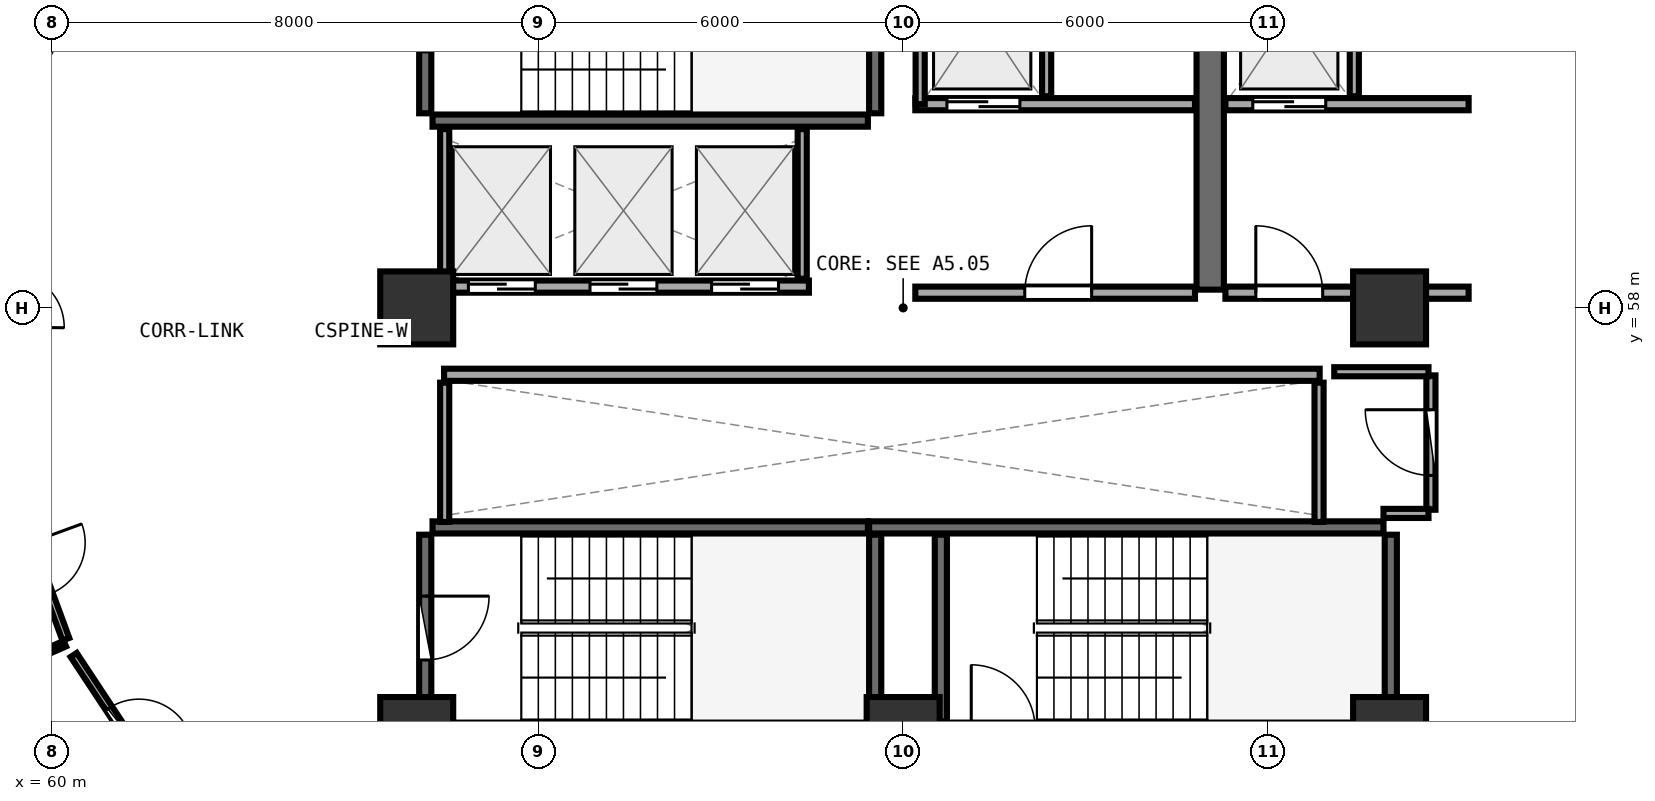
"""IFC4 building model, lengths in metres.
Left out: names, types, materials, properties, quantities, classifications, styles, units other than length and angle.
Written with IfcOpenShell. Run it as: python <this file> out.ifc"""

import sys

from ifc_helpers import new_model, si_unit, direction, frame, frame_2d, origin, origin_2d, place, context, subcontext, project, spatial, rectangle, extrude, element, fill, save


model = new_model("IFC4")
c1 = context("Model", 3, precision=1e-05, world=origin(), true_north=direction((0.0, 1.0)))
c2 = subcontext(c1, "Body", "Model", "MODEL_VIEW")
j1 = project(units=[si_unit("LENGTHUNIT", "METRE"), si_unit("PLANEANGLEUNIT", "RADIAN")], contexts=[c1])
p1 = place(None, origin())
s1 = spatial("IfcSite", under=j1, at=p1, CompositionType="ELEMENT")
p2 = place(p1, origin())
s2 = spatial("IfcBuilding", under=s1, at=p2, CompositionType="ELEMENT")
p3 = place(p2, frame((0.0, 0.0, 117.6)))
s3 = spatial("IfcBuildingStorey", under=s2, at=p3, CompositionType="ELEMENT", Elevation=117.6)
for number, where, z_axis, x_axis in (
    (1, (66.0, 51.0, 0.0), (0.0, 0.0, 1.0), (1.0, 0.0, 0.0)),
    (2, (74.0, 51.0, 0.0), (0.0, 0.0, 1.0), (1.0, 0.0, 0.0)),
    (3, (82.0, 51.0, 0.0), (0.0, 0.0, 1.0), (1.0, 0.0, 0.0)),
    (4, (82.0, 58.0, 0.0), (0.0, 0.0, 1.0), (1.0, 0.0, 0.0)),
    (5, (66.0, 58.0, 0.0), (0.0, 0.0, 1.0), (1.0, 0.0, 0.0)),
):
    element("IfcColumn", number, at=place(p3, frame(where, z_axis=z_axis, x_axis=x_axis)), inside=s3, PredefinedType="PILASTER", context=c2, shape_type="SweptSolid", body=[
        extrude(rectangle(XDim=1.2, YDim=1.2, at=origin_2d()), origin(), (0.0, 0.0, 1.0), 3.75),
    ])
p4 = place(p3, frame((66.26, 61.08, 0.0), z_axis=(0.0, 0.0, 1.0), x_axis=(1.0, 0.0, 0.0)))
e6 = element("IfcWall", 6, at=p4, inside=s3, PredefinedType="SHEAR", context=c2, shape_type="SweptSolid", body=[
    extrude(rectangle(XDim=7.16, YDim=0.2, at=frame_2d((3.58, 0.0))), origin(), (0.0, 0.0, 1.0), 3.49),
])
p5 = place(p3, frame((73.54, 61.2, 0.0), z_axis=(0.0, 0.0, 1.0), x_axis=(0.0, 1.0, 0.0)))
e7 = element("IfcWall", 7, at=p5, inside=s3, PredefinedType="SHEAR", context=c2, shape_type="SweptSolid", body=[
    extrude(rectangle(XDim=3.07, YDim=0.2, at=frame_2d((1.535, 0.0))), origin(), (0.0, 0.0, 1.0), 3.49),
])
p6 = place(p3, frame((66.14, 64.27, 0.0), z_axis=(0.0, 0.0, 1.0), x_axis=(0.0, -1.0, 0.0)))
e8 = element("IfcWall", 8, at=p6, inside=s3, PredefinedType="SHEAR", context=c2, shape_type="SweptSolid", body=[
    extrude(rectangle(XDim=3.07, YDim=0.2, at=frame_2d((1.535, 0.0))), origin(), (0.0, 0.0, 1.0), 3.49),
])
p7 = place(p6, frame((1.01, 0.0, 0.0)))
e9 = element("IfcOpeningElement", 9, at=p7, cuts=e8, PredefinedType="OPENING", context=c2, shape_type="SweptSolid", body=[
    extrude(rectangle(XDim=1.05, YDim=2.1, at=frame_2d((0.525, 1.05))), frame((0.0, 0.11, 0.0), z_axis=(0.0, -1.0, 0.0), x_axis=(1.0, 0.0, 0.0)), (0.0, 0.0, 1.0), 0.22),
])
p8 = place(p3, frame((82.02, 51.2, 0.0), z_axis=(0.0, 0.0, 1.0), x_axis=(0.0, 1.0, 0.0)))
e10 = element("IfcWall", 10, at=p8, inside=s3, PredefinedType="SHEAR", context=c2, shape_type="SweptSolid", body=[
    extrude(rectangle(XDim=3.07, YDim=0.2, at=frame_2d((1.535, 0.0))), origin(), (0.0, 0.0, 1.0), 3.49),
])
p9 = place(p3, frame((81.9, 54.39, 0.0), z_axis=(0.0, 0.0, 1.0), x_axis=(-1.0, 0.0, 0.0)))
e11 = element("IfcWall", 11, at=p9, inside=s3, PredefinedType="SHEAR", context=c2, shape_type="SweptSolid", body=[
    extrude(rectangle(XDim=8.46, YDim=0.2, at=frame_2d((4.23, 0.0))), origin(), (0.0, 0.0, 1.0), 3.49),
])
for number, where, z_axis, x_axis in (
    (12, (74.62, 54.27, 0.0), (0.0, 0.0, 1.0), (0.0, -1.0, 0.0)),
    (13, (73.54, 51.2, 0.0), (0.0, 0.0, 1.0), (0.0, 1.0, 0.0)),
):
    element("IfcWall", number, at=place(p3, frame(where, z_axis=z_axis, x_axis=x_axis)), inside=s3, PredefinedType="SHEAR", context=c2, shape_type="SweptSolid", body=[
        extrude(rectangle(XDim=3.07, YDim=0.2, at=frame_2d((1.535, 0.0))), origin(), (0.0, 0.0, 1.0), 3.49),
    ])
p10 = place(p3, frame((73.42, 54.39, 0.0), z_axis=(0.0, 0.0, 1.0), x_axis=(-1.0, 0.0, 0.0)))
e14 = element("IfcWall", 14, at=p10, inside=s3, PredefinedType="SHEAR", context=c2, shape_type="SweptSolid", body=[
    extrude(rectangle(XDim=7.16, YDim=0.2, at=frame_2d((3.58, 0.0))), origin(), (0.0, 0.0, 1.0), 3.49),
])
p11 = place(p3, frame((66.14, 54.27, 0.0), z_axis=(0.0, 0.0, 1.0), x_axis=(0.0, -1.0, 0.0)))
e15 = element("IfcWall", 15, at=p11, inside=s3, PredefinedType="SHEAR", context=c2, shape_type="SweptSolid", body=[
    extrude(rectangle(XDim=3.07, YDim=0.2, at=frame_2d((1.535, 0.0))), origin(), (0.0, 0.0, 1.0), 3.49),
])
p12 = place(p11, frame((1.01, 0.0, 0.0)))
e16 = element("IfcOpeningElement", 16, at=p12, cuts=e15, PredefinedType="OPENING", context=c2, shape_type="SweptSolid", body=[
    extrude(rectangle(XDim=1.05, YDim=2.1, at=frame_2d((0.525, 1.05))), frame((0.0, 0.11, 0.0), z_axis=(0.0, -1.0, 0.0), x_axis=(1.0, 0.0, 0.0)), (0.0, 0.0, 1.0), 0.22),
])
p13 = place(p3, frame((79.05, 58.3, 0.0), z_axis=(0.0, 0.0, 1.0), x_axis=(0.0, 1.0, 0.0)))
e17 = element("IfcWall", 17, at=p13, inside=s3, PredefinedType="SHEAR", context=c2, shape_type="SweptSolid", body=[
    extrude(rectangle(XDim=6.3, YDim=0.45, at=frame_2d((3.15, 0.0))), origin(), (0.0, 0.0, 1.0), 3.49),
])
p14 = place(p3, frame((74.2, 61.35, 0.0), z_axis=(0.0, 0.0, 1.0), x_axis=(1.0, 0.0, 0.0)))
e18 = element("IfcWall", 18, at=p14, inside=s3, PredefinedType="SOLIDWALL", context=c2, shape_type="SweptSolid", body=[
    extrude(rectangle(XDim=4.6, YDim=0.2, at=frame_2d((2.3, 0.0))), origin(), (0.0, 0.0, 1.0), 3.48),
])
p15 = place(p14, frame((0.52, 0.0, 0.0)))
e19 = element("IfcOpeningElement", 19, at=p15, cuts=e18, PredefinedType="OPENING", context=c2, shape_type="SweptSolid", body=[
    extrude(rectangle(XDim=1.2, YDim=2.15, at=frame_2d((0.6, 1.075))), frame((0.0, 0.11, 0.0), z_axis=(0.0, -1.0, 0.0), x_axis=(1.0, 0.0, 0.0)), (0.0, 0.0, 1.0), 0.22),
])
p16 = place(p3, frame((74.28, 61.35, 0.0), z_axis=(0.0, 0.0, 1.0), x_axis=(0.0, 1.0, 0.0)))
e20 = element("IfcWall", 20, at=p16, inside=s3, PredefinedType="PARTITIONING", context=c2, shape_type="SweptSolid", body=[
    extrude(rectangle(XDim=2.97, YDim=0.15, at=frame_2d((1.485, 0.0))), origin(), (0.0, 0.0, 1.0), 3.48),
])
p17 = place(p3, frame((76.36, 61.48, 0.0), z_axis=(0.0, 0.0, 1.0), x_axis=(0.0, 1.0, 0.0)))
e21 = element("IfcWall", 21, at=p17, inside=s3, PredefinedType="PARTITIONING", context=c2, shape_type="SweptSolid", body=[
    extrude(rectangle(XDim=2.84, YDim=0.15, at=frame_2d((1.42, 0.0))), origin(), (0.0, 0.0, 1.0), 3.48),
])
p18 = place(p3, frame((79.3, 61.35, 0.0), z_axis=(0.0, 0.0, 1.0), x_axis=(1.0, 0.0, 0.0)))
e22 = element("IfcWall", 22, at=p18, inside=s3, PredefinedType="SOLIDWALL", context=c2, shape_type="SweptSolid", body=[
    extrude(rectangle(XDim=4.0, YDim=0.2, at=frame_2d((2.0, 0.0))), origin(), (0.0, 0.0, 1.0), 2.775),
])
p19 = place(p18, frame((0.45, 0.0, 0.0)))
e23 = element("IfcOpeningElement", 23, at=p19, cuts=e22, PredefinedType="OPENING", context=c2, shape_type="SweptSolid", body=[
    extrude(rectangle(XDim=1.2, YDim=2.15, at=frame_2d((0.6, 1.075))), frame((0.0, 0.11, 0.0), z_axis=(0.0, -1.0, 0.0), x_axis=(1.0, 0.0, 0.0)), (0.0, 0.0, 1.0), 0.22),
])
p20 = place(p3, frame((81.42, 61.48, 0.0), z_axis=(0.0, 0.0, 1.0), x_axis=(0.0, 1.0, 0.0)))
e24 = element("IfcWall", 24, at=p20, inside=s3, PredefinedType="PARTITIONING", context=c2, shape_type="SweptSolid", body=[
    extrude(rectangle(XDim=2.84, YDim=0.15, at=frame_2d((1.42, 0.0))), origin(), (0.0, 0.0, 1.0), 3.48),
])
p21 = place(p3, frame((74.2, 58.25, 0.0), z_axis=(0.0, 0.0, 1.0), x_axis=(1.0, 0.0, 0.0)))
e25 = element("IfcWall", 25, at=p21, inside=s3, PredefinedType="SOLIDWALL", context=c2, shape_type="SweptSolid", body=[
    extrude(rectangle(XDim=4.6, YDim=0.2, at=frame_2d((2.3, 0.0))), origin(), (0.0, 0.0, 1.0), 3.48),
])
p22 = place(p21, frame((1.8, 0.0, 0.0)))
e26 = element("IfcOpeningElement", 26, at=p22, cuts=e25, PredefinedType="OPENING", context=c2, shape_type="SweptSolid", body=[
    extrude(rectangle(XDim=1.1, YDim=2.1, at=frame_2d((0.55, 1.05))), frame((0.0, 0.11, 0.0), z_axis=(0.0, -1.0, 0.0), x_axis=(1.0, 0.0, 0.0)), (0.0, 0.0, 1.0), 0.22),
])
p23 = place(p3, frame((79.3, 58.25, 0.0), z_axis=(0.0, 0.0, 1.0), x_axis=(1.0, 0.0, 0.0)))
e27 = element("IfcWall", 27, at=p23, inside=s3, PredefinedType="SOLIDWALL", context=c2, shape_type="SweptSolid", body=[
    extrude(rectangle(XDim=4.0, YDim=0.2, at=frame_2d((2.0, 0.0))), origin(), (0.0, 0.0, 1.0), 2.775),
])
p24 = place(p23, frame((0.5, 0.0, 0.0)))
e28 = element("IfcOpeningElement", 28, at=p24, cuts=e27, PredefinedType="OPENING", context=c2, shape_type="SweptSolid", body=[
    extrude(rectangle(XDim=1.1, YDim=2.1, at=frame_2d((0.55, 1.05))), frame((0.0, 0.11, 0.0), z_axis=(0.0, -1.0, 0.0), x_axis=(1.0, 0.0, 0.0)), (0.0, 0.0, 1.0), 0.22),
])
p25 = place(p3, frame((66.45, 58.35, 0.0), z_axis=(0.0, 0.0, 1.0), x_axis=(1.0, 0.0, 0.0)))
e29 = element("IfcWall", 29, at=p25, inside=s3, PredefinedType="SOLIDWALL", context=c2, shape_type="SweptSolid", body=[
    extrude(rectangle(XDim=6.0, YDim=0.2, at=frame_2d((3.0, 0.0))), origin(), (0.0, 0.0, 1.0), 3.48),
])
p26 = place(p25, frame((0.4, 0.0, 0.0)))
e30 = element("IfcOpeningElement", 30, at=p26, cuts=e29, PredefinedType="OPENING", context=c2, shape_type="SweptSolid", body=[
    extrude(rectangle(XDim=1.1, YDim=2.1, at=frame_2d((0.55, 1.05))), frame((0.0, 0.11, 0.0), z_axis=(0.0, -1.0, 0.0), x_axis=(1.0, 0.0, 0.0)), (0.0, 0.0, 1.0), 0.22),
])
p27 = place(p25, frame((2.4, 0.0, 0.0)))
e31 = element("IfcOpeningElement", 31, at=p27, cuts=e29, PredefinedType="OPENING", context=c2, shape_type="SweptSolid", body=[
    extrude(rectangle(XDim=1.1, YDim=2.1, at=frame_2d((0.55, 1.05))), frame((0.0, 0.11, 0.0), z_axis=(0.0, -1.0, 0.0), x_axis=(1.0, 0.0, 0.0)), (0.0, 0.0, 1.0), 0.22),
])
p28 = place(p25, frame((4.4, 0.0, 0.0)))
e32 = element("IfcOpeningElement", 32, at=p28, cuts=e29, PredefinedType="OPENING", context=c2, shape_type="SweptSolid", body=[
    extrude(rectangle(XDim=1.1, YDim=2.1, at=frame_2d((0.55, 1.05))), frame((0.0, 0.11, 0.0), z_axis=(0.0, -1.0, 0.0), x_axis=(1.0, 0.0, 0.0)), (0.0, 0.0, 1.0), 0.22),
])
for number, where, z_axis, x_axis in (
    (33, (66.46, 58.48, 0.0), (0.0, 0.0, 1.0), (0.0, 1.0, 0.0)),
    (34, (72.34, 58.48, 0.0), (0.0, 0.0, 1.0), (0.0, 1.0, 0.0)),
):
    element("IfcWall", number, at=place(p3, frame(where, z_axis=z_axis, x_axis=x_axis)), inside=s3, PredefinedType="PARTITIONING", context=c2, shape_type="SweptSolid", body=[
        extrude(rectangle(XDim=2.46, YDim=0.15, at=frame_2d((1.23, 0.0))), origin(), (0.0, 0.0, 1.0), 3.48),
    ])
p29 = place(p3, frame((66.45, 56.9, 0.0), z_axis=(0.0, 0.0, 1.0), x_axis=(1.0, 0.0, 0.0)))
e35 = element("IfcWall", 35, at=p29, inside=s3, PredefinedType="SOLIDWALL", context=c2, shape_type="SweptSolid", body=[
    extrude(rectangle(XDim=14.4, YDim=0.2, at=frame_2d((7.2, 0.0))), origin(), (0.0, 0.0, 1.0), 3.48),
])
for number, where, z_axis, x_axis in (
    (36, (66.46, 54.48, 0.0), (0.0, 0.0, 1.0), (0.0, 1.0, 0.0)),
    (37, (80.84, 54.48, 0.0), (0.0, 0.0, 1.0), (0.0, 1.0, 0.0)),
):
    element("IfcWall", number, at=place(p3, frame(where, z_axis=z_axis, x_axis=x_axis)), inside=s3, PredefinedType="PARTITIONING", context=c2, shape_type="SweptSolid", body=[
        extrude(rectangle(XDim=2.29, YDim=0.15, at=frame_2d((1.145, 0.0))), origin(), (0.0, 0.0, 1.0), 3.48),
    ])
p30 = place(p3, frame((82.68, 54.68, 0.0), z_axis=(0.0, 0.0, 1.0), x_axis=(0.0, 1.0, 0.0)))
e38 = element("IfcWall", 38, at=p30, inside=s3, PredefinedType="PARTITIONING", context=c2, shape_type="SweptSolid", body=[
    extrude(rectangle(XDim=2.21, YDim=0.15, at=frame_2d((1.105, 0.0))), origin(), (0.0, 0.0, 1.0), 3.48),
])
p31 = place(p30, frame((0.565, 0.0, 0.0)))
e39 = element("IfcOpeningElement", 39, at=p31, cuts=e38, PredefinedType="OPENING", context=c2, shape_type="SweptSolid", body=[
    extrude(rectangle(XDim=1.08, YDim=2.1, at=frame_2d((0.54, 1.05))), frame((0.0, 0.085, 0.0), z_axis=(0.0, -1.0, 0.0), x_axis=(1.0, 0.0, 0.0)), (0.0, 0.0, 1.0), 0.17),
])
p32 = place(p3, frame((62.199, 66.421, 0.0), z_axis=(0.0, 0.0, 1.0), x_axis=(-0.478256103777, -0.878220416069, 0.0)))
e40 = element("IfcWall", 40, at=p32, inside=s3, PredefinedType="PARTITIONING", context=c2, shape_type="SweptSolid", body=[
    extrude(rectangle(XDim=5.741, YDim=0.12, at=frame_2d((2.871, 0.0))), origin(), (0.0, 0.0, 1.0), 2.925),
])
p33 = place(p32, frame((2.42, 0.0, 0.0)))
e41 = element("IfcOpeningElement", 41, at=p33, cuts=e40, PredefinedType="OPENING", context=c2, shape_type="SweptSolid", body=[
    extrude(rectangle(XDim=0.9, YDim=2.08, at=frame_2d((0.45, 1.04))), frame((0.0, 0.07, 0.0), z_axis=(0.0, -1.0, 0.0), x_axis=(1.0, 0.0, 0.0)), (0.0, 0.0, 1.0), 0.14),
])
p34 = place(p3, frame((59.375, 54.881, 0.0), z_axis=(0.0, 0.0, 1.0), x_axis=(0.344396316594, -0.938824359035, 0.0)))
e42 = element("IfcWall", 42, at=p34, inside=s3, PredefinedType="PARTITIONING", context=c2, shape_type="SweptSolid", body=[
    extrude(rectangle(XDim=2.481, YDim=0.12, at=frame_2d((1.241, 0.0))), origin(), (0.0, 0.0, 1.0), 3.235),
])
p35 = place(p34, frame((0.791, 0.0, 0.0)))
e43 = element("IfcOpeningElement", 43, at=p35, cuts=e42, PredefinedType="OPENING", context=c2, shape_type="SweptSolid", body=[
    extrude(rectangle(XDim=0.9, YDim=2.08, at=frame_2d((0.45, 1.04))), frame((0.0, 0.07, 0.0), z_axis=(0.0, -1.0, 0.0), x_axis=(1.0, 0.0, 0.0)), (0.0, 0.0, 1.0), 0.14),
])
p36 = place(p3, frame((60.358, 52.293, 0.0), z_axis=(0.0, 0.0, 1.0), x_axis=(0.551050840628, -0.834471671804, 0.0)))
e44 = element("IfcWall", 44, at=p36, inside=s3, PredefinedType="PARTITIONING", context=c2, shape_type="SweptSolid", body=[
    extrude(rectangle(XDim=3.0, YDim=0.12, at=frame_2d((1.5, 0.0))), origin(), (0.0, 0.0, 1.0), 2.925),
])
p37 = place(p36, frame((1.05, 0.0, 0.0)))
e45 = element("IfcOpeningElement", 45, at=p37, cuts=e44, PredefinedType="OPENING", context=c2, shape_type="SweptSolid", body=[
    extrude(rectangle(XDim=0.9, YDim=2.08, at=frame_2d((0.45, 1.04))), frame((0.0, 0.07, 0.0), z_axis=(0.0, -1.0, 0.0), x_axis=(1.0, 0.0, 0.0)), (0.0, 0.0, 1.0), 0.14),
])
p38 = place(p3, frame((81.9, 54.62, 0.0), z_axis=(0.0, 0.0, 1.0), x_axis=(1.0, 0.0, 0.0)))
e46 = element("IfcWall", 46, at=p38, inside=s3, PredefinedType="PARTITIONING", context=c2, shape_type="SweptSolid", body=[
    extrude(rectangle(XDim=0.74, YDim=0.15, at=frame_2d((0.37, 0.0))), origin(), (0.0, 0.0, 1.0), 2.775),
])
p39 = place(p3, frame((82.64, 56.95, 0.0), z_axis=(0.0, 0.0, 1.0), x_axis=(-1.0, 0.0, 0.0)))
e47 = element("IfcWall", 47, at=p39, inside=s3, PredefinedType="PARTITIONING", context=c2, shape_type="SweptSolid", body=[
    extrude(rectangle(XDim=1.55, YDim=0.15, at=frame_2d((0.775, 0.0))), origin(), (0.0, 0.0, 1.0), 2.775),
])
p40 = place(p3, frame((60.213, 52.479, 0.0), z_axis=(0.0, 0.0, 1.0), x_axis=(-0.914847920866, -0.403798565732, 0.0)))
e48 = element("IfcWall", 48, at=p40, inside=s3, PredefinedType="PARTITIONING", context=c2, shape_type="SweptSolid", body=[
    extrude(rectangle(XDim=3.719, YDim=0.1, at=frame_2d((1.86, 0.0))), origin(), (0.0, 0.0, 1.0), 3.175),
])
p41 = place(p12, origin())
e49 = element("IfcDoor", 49, at=p41, inside=s3, OperationType="SINGLE_SWING_LEFT", PredefinedType="DOOR", context=c2, shape_type="SweptSolid", body=[
    extrude(rectangle(XDim=1.05, YDim=2.1, at=frame_2d((0.525, 1.05))), frame((0.0, 0.025, 0.0), z_axis=(0.0, -1.0, 0.0), x_axis=(1.0, 0.0, 0.0)), (0.0, 0.0, 1.0), 0.05),
])
fill(e16, e49)
p42 = place(p15, origin())
e50 = element("IfcDoor", 50, at=p42, inside=s3, OperationType="DOUBLE_DOOR_SLIDING", PredefinedType="DOOR", context=c2, shape_type="SweptSolid", body=[
    extrude(rectangle(XDim=1.2, YDim=2.15, at=frame_2d((0.6, 1.075))), frame((0.0, 0.025, 0.0), z_axis=(0.0, -1.0, 0.0), x_axis=(1.0, 0.0, 0.0)), (0.0, 0.0, 1.0), 0.05),
])
fill(e19, e50)
p43 = place(p19, origin())
e51 = element("IfcDoor", 51, at=p43, inside=s3, OperationType="DOUBLE_DOOR_SLIDING", PredefinedType="DOOR", context=c2, shape_type="SweptSolid", body=[
    extrude(rectangle(XDim=1.2, YDim=2.15, at=frame_2d((0.6, 1.075))), frame((0.0, 0.025, 0.0), z_axis=(0.0, -1.0, 0.0), x_axis=(1.0, 0.0, 0.0)), (0.0, 0.0, 1.0), 0.05),
])
fill(e23, e51)
p44 = place(p22, frame((1.1, 0.0, 0.0), z_axis=(0.0, 0.0, 1.0), x_axis=(-1.0, 0.0, 0.0)))
e52 = element("IfcDoor", 52, at=p44, inside=s3, OperationType="SINGLE_SWING_LEFT", PredefinedType="DOOR", context=c2, shape_type="SweptSolid", body=[
    extrude(rectangle(XDim=1.1, YDim=2.1, at=frame_2d((0.55, 1.05))), frame((0.0, 0.025, 0.0), z_axis=(0.0, -1.0, 0.0), x_axis=(1.0, 0.0, 0.0)), (0.0, 0.0, 1.0), 0.05),
])
fill(e26, e52)
p45 = place(p24, frame((1.1, 0.0, 0.0), z_axis=(0.0, 0.0, 1.0), x_axis=(-1.0, 0.0, 0.0)))
e53 = element("IfcDoor", 53, at=p45, inside=s3, OperationType="SINGLE_SWING_RIGHT", PredefinedType="DOOR", context=c2, shape_type="SweptSolid", body=[
    extrude(rectangle(XDim=1.1, YDim=2.1, at=frame_2d((0.55, 1.05))), frame((0.0, 0.025, 0.0), z_axis=(0.0, -1.0, 0.0), x_axis=(1.0, 0.0, 0.0)), (0.0, 0.0, 1.0), 0.05),
])
fill(e28, e53)
p46 = place(p26, origin())
e54 = element("IfcDoor", 54, at=p46, inside=s3, OperationType="DOUBLE_DOOR_SLIDING", PredefinedType="DOOR", context=c2, shape_type="SweptSolid", body=[
    extrude(rectangle(XDim=1.1, YDim=2.1, at=frame_2d((0.55, 1.05))), frame((0.0, 0.025, 0.0), z_axis=(0.0, -1.0, 0.0), x_axis=(1.0, 0.0, 0.0)), (0.0, 0.0, 1.0), 0.05),
])
fill(e30, e54)
p47 = place(p27, origin())
e55 = element("IfcDoor", 55, at=p47, inside=s3, OperationType="DOUBLE_DOOR_SLIDING", PredefinedType="DOOR", context=c2, shape_type="SweptSolid", body=[
    extrude(rectangle(XDim=1.1, YDim=2.1, at=frame_2d((0.55, 1.05))), frame((0.0, 0.025, 0.0), z_axis=(0.0, -1.0, 0.0), x_axis=(1.0, 0.0, 0.0)), (0.0, 0.0, 1.0), 0.05),
])
fill(e31, e55)
p48 = place(p28, origin())
e56 = element("IfcDoor", 56, at=p48, inside=s3, OperationType="DOUBLE_DOOR_SLIDING", PredefinedType="DOOR", context=c2, shape_type="SweptSolid", body=[
    extrude(rectangle(XDim=1.1, YDim=2.1, at=frame_2d((0.55, 1.05))), frame((0.0, 0.025, 0.0), z_axis=(0.0, -1.0, 0.0), x_axis=(1.0, 0.0, 0.0)), (0.0, 0.0, 1.0), 0.05),
])
fill(e32, e56)
p49 = place(p31, origin())
e57 = element("IfcDoor", 57, at=p49, inside=s3, OperationType="SINGLE_SWING_RIGHT", PredefinedType="DOOR", context=c2, shape_type="SweptSolid", body=[
    extrude(rectangle(XDim=1.08, YDim=2.1, at=frame_2d((0.54, 1.05))), frame((0.0, 0.025, 0.0), z_axis=(0.0, -1.0, 0.0), x_axis=(1.0, 0.0, 0.0)), (0.0, 0.0, 1.0), 0.05),
])
fill(e39, e57)
p50 = place(p37, origin())
e58 = element("IfcDoor", 58, at=p50, inside=s3, OperationType="SINGLE_SWING_RIGHT", PredefinedType="DOOR", context=c2, shape_type="SweptSolid", body=[
    extrude(rectangle(XDim=0.9, YDim=2.08, at=frame_2d((0.45, 1.04))), frame((0.0, 0.025, 0.0), z_axis=(0.0, -1.0, 0.0), x_axis=(1.0, 0.0, 0.0)), (0.0, 0.0, 1.0), 0.05),
])
fill(e45, e58)
save(model, sys.argv[1])
